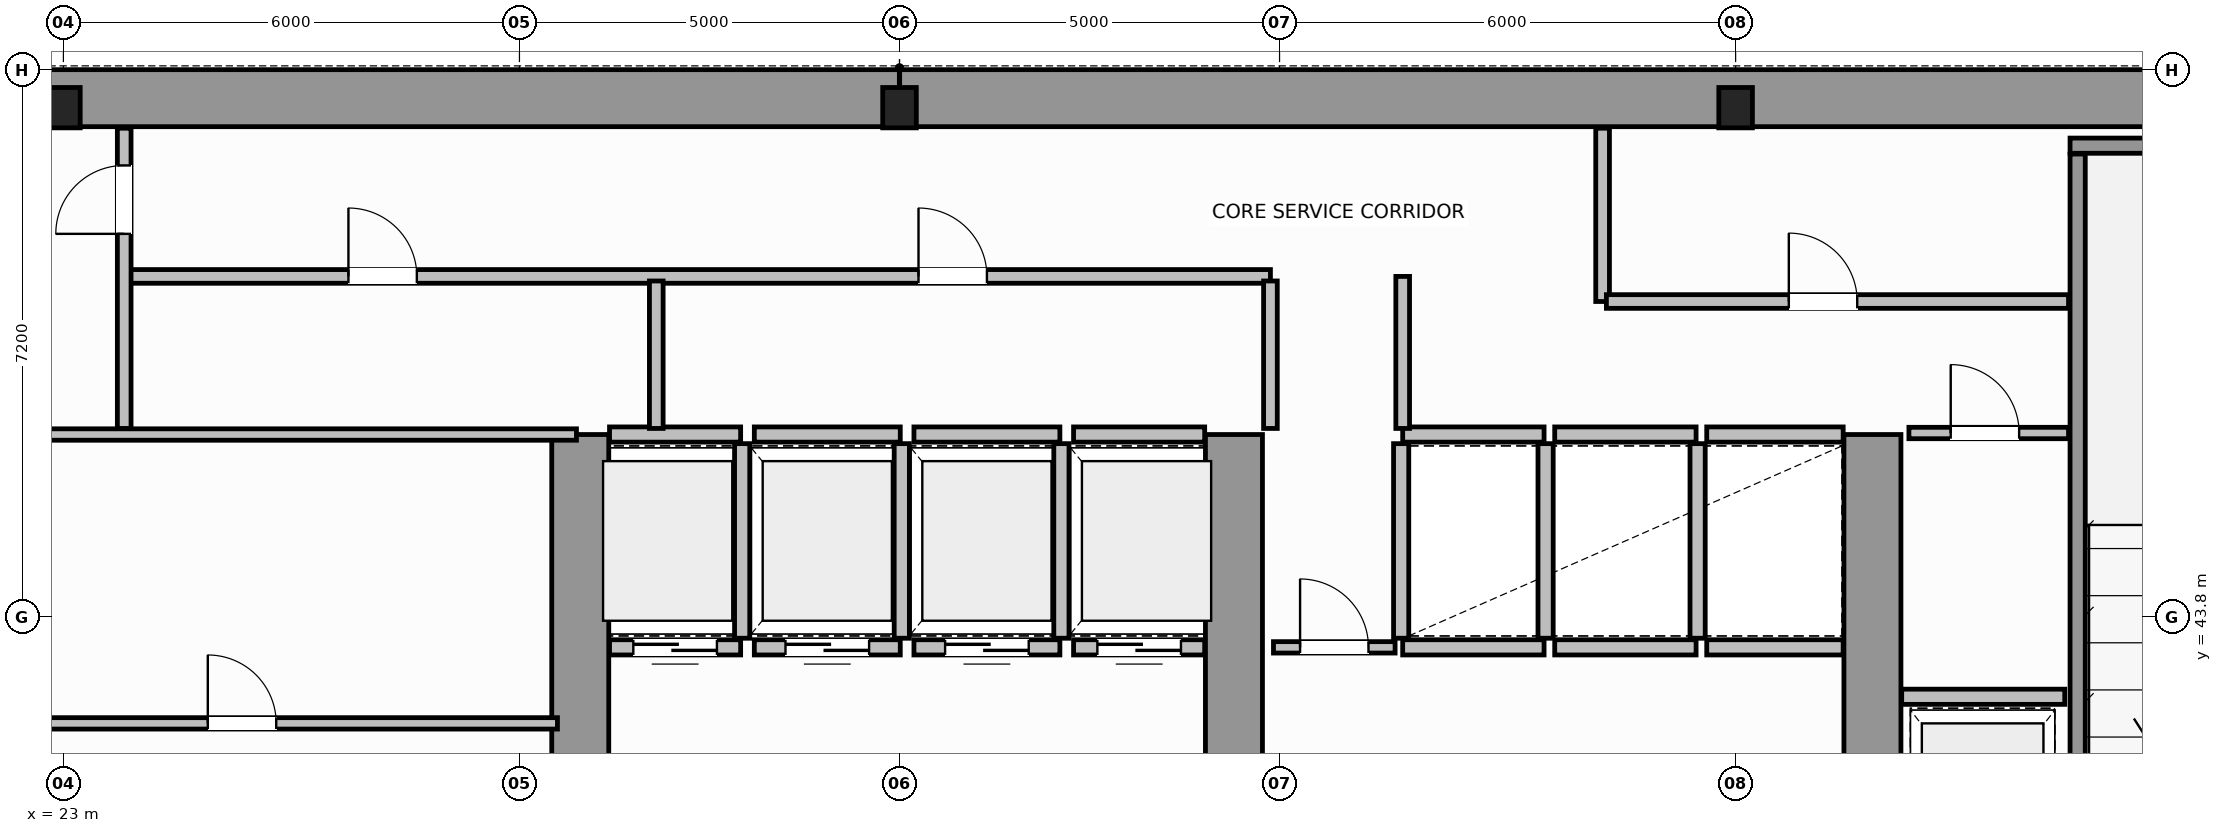
"""IFC4 building model, lengths in metres.
Left out: names, types, materials, properties, quantities, classifications, styles, units other than length and angle.
Written with IfcOpenShell. Run it as: python <this file> out.ifc"""

import sys

from ifc_helpers import new_model, si_unit, direction, frame, frame_2d, origin, origin_2d, place, context, subcontext, project, spatial, rectangle, i_section, extrude, source, transform, mapped, element, fill, save


model = new_model("IFC4")
c1 = context("Model", 3, precision=1e-05, world=origin(), true_north=direction((0.0, 1.0)))
c2 = subcontext(c1, "Body", "Model", "MODEL_VIEW")
j1 = project(units=[si_unit("LENGTHUNIT", "METRE"), si_unit("PLANEANGLEUNIT", "RADIAN")], contexts=[c1])
p1 = place(None, origin())
s1 = spatial("IfcSite", under=j1, at=p1, CompositionType="ELEMENT")
p2 = place(p1, origin())
s2 = spatial("IfcBuilding", under=s1, at=p2, CompositionType="ELEMENT")
p3 = place(p2, frame((0.0, 0.0, 122.4)))
s3 = spatial("IfcBuildingStorey", under=s2, at=p3, CompositionType="ELEMENT", Elevation=122.4)
m1 = source(origin(), c2, "Body", "SweptSolid", [
    extrude(i_section(OverallWidth=0.442, OverallDepth=0.531, WebThickness=0.065, FlangeThickness=0.076, FilletRadius=0.015, at=origin_2d()), origin(), (0.0, 0.0, 1.0), 3.8),
])
for number, where, z_axis, x_axis in (
    (1, (23.0, 50.5, 0.0), (0.0, 0.0, 1.0), (1.0, 0.0, 0.0)),
    (2, (34.0, 50.5, 0.0), (0.0, 0.0, 1.0), (1.0, 0.0, 0.0)),
    (3, (45.0, 50.5, 0.0), (0.0, 0.0, 1.0), (1.0, 0.0, 0.0)),
):
    element("IfcColumn", number, at=place(p3, frame(where, z_axis=z_axis, x_axis=x_axis)), inside=s3, PredefinedType="COLUMN", context=c2, shape_type="MappedRepresentation", body=[
        mapped(m1, transform((0.0, 0.0, 0.0), scale=1.0)),
    ])
for number, where, z_axis, x_axis in (
    (4, (14.379, 50.625, 0.0), (0.0, 0.0, 1.0), (1.0, 0.0, 0.0)),
    (5, (34.002, 50.625, 0.0), (0.0, 0.0, 1.0), (1.0, 0.0, 0.0)),
):
    element("IfcWall", number, at=place(p3, frame(where, z_axis=z_axis, x_axis=x_axis)), inside=s3, PredefinedType="SHEAR", context=c2, shape_type="SweptSolid", body=[
        extrude(rectangle(XDim=19.619, YDim=0.75, at=frame_2d((9.81, 0.0))), origin(), (0.0, 0.0, 1.0), 3.8),
    ])
for number, where, z_axis, x_axis in (
    (6, (29.8, 36.895, 0.0), (0.0, 0.0, 1.0), (0.0, 1.0, 0.0)),
    (7, (38.4, 36.895, 0.0), (0.0, 0.0, 1.0), (0.0, 1.0, 0.0)),
    (8, (46.8, 36.895, 0.0), (0.0, 0.0, 1.0), (0.0, 1.0, 0.0)),
):
    element("IfcWall", number, at=place(p3, frame(where, z_axis=z_axis, x_axis=x_axis)), inside=s3, PredefinedType="SHEAR", context=c2, shape_type="SweptSolid", body=[
        extrude(rectangle(XDim=9.305, YDim=0.75, at=frame_2d((4.652, 0.0))), origin(), (0.0, 0.0, 1.0), 3.8),
    ])
p4 = place(p3, frame((49.4, 50.0, 0.0), z_axis=(0.0, 0.0, 1.0), x_axis=(1.0, 0.0, 0.0)))
e9 = element("IfcWall", 9, at=p4, inside=s3, PredefinedType="SOLIDWALL", context=c2, shape_type="SweptSolid", body=[
    extrude(rectangle(XDim=4.225, YDim=0.2, at=frame_2d((2.113, 0.0))), origin(), (0.0, 0.0, 1.0), 3.8),
])
p5 = place(p3, frame((49.5, 39.96, 0.0), z_axis=(0.0, 0.0, 1.0), x_axis=(0.0, 1.0, 0.0)))
e10 = element("IfcWall", 10, at=p5, inside=s3, PredefinedType="SOLIDWALL", context=c2, shape_type="SweptSolid", body=[
    extrude(rectangle(XDim=9.93, YDim=0.2, at=frame_2d((4.965, 0.0))), origin(), (0.0, 0.0, 1.0), 3.8),
])
p6 = place(p3, frame((30.185, 43.4, 0.0), z_axis=(0.0, 0.0, 1.0), x_axis=(1.0, 0.0, 0.0)))
e11 = element("IfcWall", 11, at=p6, inside=s3, PredefinedType="SOLIDWALL", context=c2, shape_type="SweptSolid", body=[
    extrude(rectangle(XDim=1.725, YDim=0.2, at=frame_2d((0.862, 0.0))), origin(), (0.0, 0.0, 1.0), 3.58),
])
p7 = place(p6, frame((0.313, 0.0, 0.0)))
e12 = element("IfcOpeningElement", 12, at=p7, cuts=e11, PredefinedType="OPENING", context=c2, shape_type="SweptSolid", body=[
    extrude(rectangle(XDim=1.1, YDim=2.15, at=frame_2d((0.55, 1.075))), frame((0.0, 0.11, 0.0), z_axis=(0.0, -1.0, 0.0), x_axis=(1.0, 0.0, 0.0)), (0.0, 0.0, 1.0), 0.22),
])
p8 = place(p3, frame((30.185, 46.2, 0.0), z_axis=(0.0, 0.0, 1.0), x_axis=(1.0, 0.0, 0.0)))
e13 = element("IfcWall", 13, at=p8, inside=s3, PredefinedType="SOLIDWALL", context=c2, shape_type="SweptSolid", body=[
    extrude(rectangle(XDim=1.725, YDim=0.2, at=frame_2d((0.862, 0.0))), origin(), (0.0, 0.0, 1.0), 3.58),
])
p9 = place(p3, frame((31.93, 43.52, 0.0), z_axis=(0.0, 0.0, 1.0), x_axis=(0.0, 1.0, 0.0)))
e14 = element("IfcWall", 14, at=p9, inside=s3, PredefinedType="SOLIDWALL", context=c2, shape_type="SweptSolid", body=[
    extrude(rectangle(XDim=2.56, YDim=0.2, at=frame_2d((1.28, 0.0))), origin(), (0.0, 0.0, 1.0), 3.58),
])
p10 = place(p3, frame((32.09, 43.4, 0.0), z_axis=(0.0, 0.0, 1.0), x_axis=(1.0, 0.0, 0.0)))
e15 = element("IfcWall", 15, at=p10, inside=s3, PredefinedType="SOLIDWALL", context=c2, shape_type="SweptSolid", body=[
    extrude(rectangle(XDim=1.92, YDim=0.2, at=frame_2d((0.96, 0.0))), origin(), (0.0, 0.0, 1.0), 3.58),
])
p11 = place(p10, frame((0.41, 0.0, 0.0)))
e16 = element("IfcOpeningElement", 16, at=p11, cuts=e15, PredefinedType="OPENING", context=c2, shape_type="SweptSolid", body=[
    extrude(rectangle(XDim=1.1, YDim=2.15, at=frame_2d((0.55, 1.075))), frame((0.0, 0.11, 0.0), z_axis=(0.0, -1.0, 0.0), x_axis=(1.0, 0.0, 0.0)), (0.0, 0.0, 1.0), 0.22),
])
p12 = place(p3, frame((32.09, 46.2, 0.0), z_axis=(0.0, 0.0, 1.0), x_axis=(1.0, 0.0, 0.0)))
e17 = element("IfcWall", 17, at=p12, inside=s3, PredefinedType="SOLIDWALL", context=c2, shape_type="SweptSolid", body=[
    extrude(rectangle(XDim=1.92, YDim=0.2, at=frame_2d((0.96, 0.0))), origin(), (0.0, 0.0, 1.0), 3.58),
])
p13 = place(p3, frame((34.03, 43.52, 0.0), z_axis=(0.0, 0.0, 1.0), x_axis=(0.0, 1.0, 0.0)))
e18 = element("IfcWall", 18, at=p13, inside=s3, PredefinedType="SOLIDWALL", context=c2, shape_type="SweptSolid", body=[
    extrude(rectangle(XDim=2.56, YDim=0.2, at=frame_2d((1.28, 0.0))), origin(), (0.0, 0.0, 1.0), 3.58),
])
p14 = place(p3, frame((34.19, 43.4, 0.0), z_axis=(0.0, 0.0, 1.0), x_axis=(1.0, 0.0, 0.0)))
e19 = element("IfcWall", 19, at=p14, inside=s3, PredefinedType="SOLIDWALL", context=c2, shape_type="SweptSolid", body=[
    extrude(rectangle(XDim=1.92, YDim=0.2, at=frame_2d((0.96, 0.0))), origin(), (0.0, 0.0, 1.0), 3.58),
])
p15 = place(p14, frame((0.41, 0.0, 0.0)))
e20 = element("IfcOpeningElement", 20, at=p15, cuts=e19, PredefinedType="OPENING", context=c2, shape_type="SweptSolid", body=[
    extrude(rectangle(XDim=1.1, YDim=2.15, at=frame_2d((0.55, 1.075))), frame((0.0, 0.11, 0.0), z_axis=(0.0, -1.0, 0.0), x_axis=(1.0, 0.0, 0.0)), (0.0, 0.0, 1.0), 0.22),
])
p16 = place(p3, frame((34.19, 46.2, 0.0), z_axis=(0.0, 0.0, 1.0), x_axis=(1.0, 0.0, 0.0)))
e21 = element("IfcWall", 21, at=p16, inside=s3, PredefinedType="SOLIDWALL", context=c2, shape_type="SweptSolid", body=[
    extrude(rectangle(XDim=1.92, YDim=0.2, at=frame_2d((0.96, 0.0))), origin(), (0.0, 0.0, 1.0), 3.58),
])
p17 = place(p3, frame((36.13, 43.52, 0.0), z_axis=(0.0, 0.0, 1.0), x_axis=(0.0, 1.0, 0.0)))
e22 = element("IfcWall", 22, at=p17, inside=s3, PredefinedType="SOLIDWALL", context=c2, shape_type="SweptSolid", body=[
    extrude(rectangle(XDim=2.56, YDim=0.2, at=frame_2d((1.28, 0.0))), origin(), (0.0, 0.0, 1.0), 3.58),
])
p18 = place(p3, frame((36.29, 43.4, 0.0), z_axis=(0.0, 0.0, 1.0), x_axis=(1.0, 0.0, 0.0)))
e23 = element("IfcWall", 23, at=p18, inside=s3, PredefinedType="SOLIDWALL", context=c2, shape_type="SweptSolid", body=[
    extrude(rectangle(XDim=1.725, YDim=0.2, at=frame_2d((0.862, 0.0))), origin(), (0.0, 0.0, 1.0), 3.58),
])
p19 = place(p18, frame((0.313, 0.0, 0.0)))
e24 = element("IfcOpeningElement", 24, at=p19, cuts=e23, PredefinedType="OPENING", context=c2, shape_type="SweptSolid", body=[
    extrude(rectangle(XDim=1.1, YDim=2.15, at=frame_2d((0.55, 1.075))), frame((0.0, 0.11, 0.0), z_axis=(0.0, -1.0, 0.0), x_axis=(1.0, 0.0, 0.0)), (0.0, 0.0, 1.0), 0.22),
])
p20 = place(p3, frame((36.29, 46.2, 0.0), z_axis=(0.0, 0.0, 1.0), x_axis=(1.0, 0.0, 0.0)))
e25 = element("IfcWall", 25, at=p20, inside=s3, PredefinedType="SOLIDWALL", context=c2, shape_type="SweptSolid", body=[
    extrude(rectangle(XDim=1.725, YDim=0.2, at=frame_2d((0.862, 0.0))), origin(), (0.0, 0.0, 1.0), 3.58),
])
for number, where, z_axis, x_axis in (
    (26, (40.62, 43.4, 0.0), (0.0, 0.0, 1.0), (1.0, 0.0, 0.0)),
    (27, (40.62, 46.2, 0.0), (0.0, 0.0, 1.0), (1.0, 0.0, 0.0)),
):
    element("IfcWall", number, at=place(p3, frame(where, z_axis=z_axis, x_axis=x_axis)), inside=s3, PredefinedType="SOLIDWALL", context=c2, shape_type="SweptSolid", body=[
        extrude(rectangle(XDim=1.86, YDim=0.2, at=frame_2d((0.93, 0.0))), origin(), (0.0, 0.0, 1.0), 3.58),
    ])
for number, where, z_axis, x_axis in (
    (28, (40.6, 43.52, 0.0), (0.0, 0.0, 1.0), (0.0, 1.0, 0.0)),
    (29, (42.5, 43.52, 0.0), (0.0, 0.0, 1.0), (0.0, 1.0, 0.0)),
):
    element("IfcWall", number, at=place(p3, frame(where, z_axis=z_axis, x_axis=x_axis)), inside=s3, PredefinedType="SOLIDWALL", context=c2, shape_type="SweptSolid", body=[
        extrude(rectangle(XDim=2.56, YDim=0.2, at=frame_2d((1.28, 0.0))), origin(), (0.0, 0.0, 1.0), 3.58),
    ])
for number, where, z_axis, x_axis in (
    (30, (42.62, 43.4, 0.0), (0.0, 0.0, 1.0), (1.0, 0.0, 0.0)),
    (31, (42.62, 46.2, 0.0), (0.0, 0.0, 1.0), (1.0, 0.0, 0.0)),
):
    element("IfcWall", number, at=place(p3, frame(where, z_axis=z_axis, x_axis=x_axis)), inside=s3, PredefinedType="SOLIDWALL", context=c2, shape_type="SweptSolid", body=[
        extrude(rectangle(XDim=1.86, YDim=0.2, at=frame_2d((0.93, 0.0))), origin(), (0.0, 0.0, 1.0), 3.58),
    ])
p21 = place(p3, frame((44.5, 43.52, 0.0), z_axis=(0.0, 0.0, 1.0), x_axis=(0.0, 1.0, 0.0)))
e32 = element("IfcWall", 32, at=p21, inside=s3, PredefinedType="SOLIDWALL", context=c2, shape_type="SweptSolid", body=[
    extrude(rectangle(XDim=2.56, YDim=0.2, at=frame_2d((1.28, 0.0))), origin(), (0.0, 0.0, 1.0), 3.58),
])
for number, where, z_axis, x_axis in (
    (33, (44.62, 43.4, 0.0), (0.0, 0.0, 1.0), (1.0, 0.0, 0.0)),
    (34, (44.62, 46.2, 0.0), (0.0, 0.0, 1.0), (1.0, 0.0, 0.0)),
):
    element("IfcWall", number, at=place(p3, frame(where, z_axis=z_axis, x_axis=x_axis)), inside=s3, PredefinedType="SOLIDWALL", context=c2, shape_type="SweptSolid", body=[
        extrude(rectangle(XDim=1.795, YDim=0.2, at=frame_2d((0.897, 0.0))), origin(), (0.0, 0.0, 1.0), 3.58),
    ])
p22 = place(p3, frame((47.185, 42.75, 0.0), z_axis=(0.0, 0.0, 1.0), x_axis=(1.0, 0.0, 0.0)))
e35 = element("IfcWall", 35, at=p22, inside=s3, PredefinedType="SOLIDWALL", context=c2, shape_type="SweptSolid", body=[
    extrude(rectangle(XDim=2.145, YDim=0.2, at=frame_2d((1.073, 0.0))), origin(), (0.0, 0.0, 1.0), 3.58),
])
p23 = place(p3, frame((21.25, 46.2, 0.0), z_axis=(0.0, 0.0, 1.0), x_axis=(1.0, 0.0, 0.0)))
e36 = element("IfcWall", 36, at=p23, inside=s3, PredefinedType="PARTITIONING", context=c2, shape_type="SweptSolid", body=[
    extrude(rectangle(XDim=8.5, YDim=0.15, at=frame_2d((4.25, 0.0))), origin(), (0.0, 0.0, 1.0), 3.58),
])
p24 = place(p3, frame((21.5, 42.4, 0.0), z_axis=(0.0, 0.0, 1.0), x_axis=(1.0, 0.0, 0.0)))
e37 = element("IfcWall", 37, at=p24, inside=s3, PredefinedType="PARTITIONING", context=c2, shape_type="SweptSolid", body=[
    extrude(rectangle(XDim=8.0, YDim=0.15, at=frame_2d((4.0, 0.0))), origin(), (0.0, 0.0, 1.0), 3.58),
])
p25 = place(p24, frame((3.4, 0.0, 0.0)))
e38 = element("IfcOpeningElement", 38, at=p25, cuts=e37, PredefinedType="OPENING", context=c2, shape_type="SweptSolid", body=[
    extrude(rectangle(XDim=0.9, YDim=2.1, at=frame_2d((0.45, 1.05))), frame((0.0, 0.085, 0.0), z_axis=(0.0, -1.0, 0.0), x_axis=(1.0, 0.0, 0.0)), (0.0, 0.0, 1.0), 0.17),
])
p26 = place(p3, frame((47.28, 46.22, 0.0), z_axis=(0.0, 0.0, 1.0), x_axis=(1.0, 0.0, 0.0)))
e39 = element("IfcWall", 39, at=p26, inside=s3, PredefinedType="PARTITIONING", context=c2, shape_type="SweptSolid", body=[
    extrude(rectangle(XDim=2.1, YDim=0.15, at=frame_2d((1.05, 0.0))), origin(), (0.0, 0.0, 1.0), 3.58),
])
p27 = place(p26, frame((0.55, 0.0, 0.0)))
e40 = element("IfcOpeningElement", 40, at=p27, cuts=e39, PredefinedType="OPENING", context=c2, shape_type="SweptSolid", body=[
    extrude(rectangle(XDim=0.9, YDim=2.1, at=frame_2d((0.45, 1.05))), frame((0.0, 0.085, 0.0), z_axis=(0.0, -1.0, 0.0), x_axis=(1.0, 0.0, 0.0)), (0.0, 0.0, 1.0), 0.17),
])
p28 = place(p3, frame((38.92, 43.4, 0.0), z_axis=(0.0, 0.0, 1.0), x_axis=(1.0, 0.0, 0.0)))
e41 = element("IfcWall", 41, at=p28, inside=s3, PredefinedType="PARTITIONING", context=c2, shape_type="SweptSolid", body=[
    extrude(rectangle(XDim=1.6, YDim=0.15, at=frame_2d((0.8, 0.0))), origin(), (0.0, 0.0, 1.0), 3.58),
])
p29 = place(p28, frame((0.35, 0.0, 0.0)))
e42 = element("IfcOpeningElement", 42, at=p29, cuts=e41, PredefinedType="OPENING", context=c2, shape_type="SweptSolid", body=[
    extrude(rectangle(XDim=0.9, YDim=2.1, at=frame_2d((0.45, 1.05))), frame((0.0, 0.085, 0.0), z_axis=(0.0, -1.0, 0.0), x_axis=(1.0, 0.0, 0.0)), (0.0, 0.0, 1.0), 0.17),
])
p30 = place(p3, frame((23.85, 48.28, 0.0), z_axis=(0.0, 0.0, 1.0), x_axis=(1.0, 0.0, 0.0)))
e43 = element("IfcWall", 43, at=p30, inside=s3, PredefinedType="PLUMBINGWALL", context=c2, shape_type="SweptSolid", body=[
    extrude(rectangle(XDim=15.03, YDim=0.18, at=frame_2d((7.515, 0.0))), origin(), (0.0, 0.0, 1.0), 3.58),
])
p31 = place(p30, frame((2.9, 0.0, 0.0)))
e44 = element("IfcOpeningElement", 44, at=p31, cuts=e43, PredefinedType="OPENING", context=c2, shape_type="SweptSolid", body=[
    extrude(rectangle(XDim=0.9, YDim=2.15, at=frame_2d((0.45, 1.075))), frame((0.0, 0.1, 0.0), z_axis=(0.0, -1.0, 0.0), x_axis=(1.0, 0.0, 0.0)), (0.0, 0.0, 1.0), 0.2),
])
p32 = place(p30, frame((10.4, 0.0, 0.0)))
e45 = element("IfcOpeningElement", 45, at=p32, cuts=e43, PredefinedType="OPENING", context=c2, shape_type="SweptSolid", body=[
    extrude(rectangle(XDim=0.9, YDim=2.15, at=frame_2d((0.45, 1.075))), frame((0.0, 0.1, 0.0), z_axis=(0.0, -1.0, 0.0), x_axis=(1.0, 0.0, 0.0)), (0.0, 0.0, 1.0), 0.2),
])
p33 = place(p3, frame((23.8, 46.28, 0.0), z_axis=(0.0, 0.0, 1.0), x_axis=(0.0, 1.0, 0.0)))
e46 = element("IfcWall", 46, at=p33, inside=s3, PredefinedType="PLUMBINGWALL", context=c2, shape_type="SweptSolid", body=[
    extrude(rectangle(XDim=3.95, YDim=0.18, at=frame_2d((1.975, 0.0))), origin(), (0.0, 0.0, 1.0), 3.58),
])
p34 = place(p33, frame((2.56, 0.0, 0.0)))
e47 = element("IfcOpeningElement", 47, at=p34, cuts=e46, PredefinedType="OPENING", context=c2, shape_type="SweptSolid", body=[
    extrude(rectangle(XDim=0.9, YDim=2.15, at=frame_2d((0.45, 1.075))), frame((0.0, 0.1, 0.0), z_axis=(0.0, -1.0, 0.0), x_axis=(1.0, 0.0, 0.0)), (0.0, 0.0, 1.0), 0.2),
])
for number, where, z_axis, x_axis in (
    (48, (30.8, 46.28, 0.0), (0.0, 0.0, 1.0), (0.0, 1.0, 0.0)),
    (49, (38.88, 46.28, 0.0), (0.0, 0.0, 1.0), (0.0, 1.0, 0.0)),
):
    element("IfcWall", number, at=place(p3, frame(where, z_axis=z_axis, x_axis=x_axis)), inside=s3, PredefinedType="PLUMBINGWALL", context=c2, shape_type="SweptSolid", body=[
        extrude(rectangle(XDim=1.94, YDim=0.18, at=frame_2d((0.97, 0.0))), origin(), (0.0, 0.0, 1.0), 3.58),
    ])
p35 = place(p3, frame((40.62, 46.28, 0.0), z_axis=(0.0, 0.0, 1.0), x_axis=(0.0, 1.0, 0.0)))
e50 = element("IfcWall", 50, at=p35, inside=s3, PredefinedType="PLUMBINGWALL", context=c2, shape_type="SweptSolid", body=[
    extrude(rectangle(XDim=2.0, YDim=0.18, at=frame_2d((1.0, 0.0))), origin(), (0.0, 0.0, 1.0), 3.58),
])
p36 = place(p3, frame((43.25, 47.95, 0.0), z_axis=(0.0, 0.0, 1.0), x_axis=(0.0, 1.0, 0.0)))
e51 = element("IfcWall", 51, at=p36, inside=s3, PredefinedType="PLUMBINGWALL", context=c2, shape_type="SweptSolid", body=[
    extrude(rectangle(XDim=2.28, YDim=0.18, at=frame_2d((1.14, 0.0))), origin(), (0.0, 0.0, 1.0), 3.58),
])
p37 = place(p3, frame((43.3, 47.95, 0.0), z_axis=(0.0, 0.0, 1.0), x_axis=(1.0, 0.0, 0.0)))
e52 = element("IfcWall", 52, at=p37, inside=s3, PredefinedType="PLUMBINGWALL", context=c2, shape_type="SweptSolid", body=[
    extrude(rectangle(XDim=6.08, YDim=0.18, at=frame_2d((3.04, 0.0))), origin(), (0.0, 0.0, 1.0), 3.58),
])
p38 = place(p37, frame((2.4, 0.0, 0.0)))
e53 = element("IfcOpeningElement", 53, at=p38, cuts=e52, PredefinedType="OPENING", context=c2, shape_type="SweptSolid", body=[
    extrude(rectangle(XDim=0.9, YDim=2.15, at=frame_2d((0.45, 1.075))), frame((0.0, 0.1, 0.0), z_axis=(0.0, -1.0, 0.0), x_axis=(1.0, 0.0, 0.0)), (0.0, 0.0, 1.0), 0.2),
])
m2 = source(origin(), c2, "Body", "SweptSolid", [
    extrude(rectangle(XDim=1.1, YDim=2.15, at=frame_2d((0.55, 1.075))), frame((0.0, 0.025, 0.0), z_axis=(0.0, -1.0, 0.0), x_axis=(1.0, 0.0, 0.0)), (0.0, 0.0, 1.0), 0.05),
])
p39 = place(p7, origin())
e54 = element("IfcDoor", 54, at=p39, inside=s3, OperationType="DOUBLE_DOOR_SLIDING", PredefinedType="DOOR", context=c2, shape_type="MappedRepresentation", body=[
    mapped(m2, transform((0.0, 0.0, 0.0), scale=1.0)),
])
fill(e12, e54)
p40 = place(p11, origin())
e55 = element("IfcDoor", 55, at=p40, inside=s3, OperationType="DOUBLE_DOOR_SLIDING", PredefinedType="DOOR", context=c2, shape_type="MappedRepresentation", body=[
    mapped(m2, transform((0.0, 0.0, 0.0), scale=1.0)),
])
fill(e16, e55)
p41 = place(p15, origin())
e56 = element("IfcDoor", 56, at=p41, inside=s3, OperationType="DOUBLE_DOOR_SLIDING", PredefinedType="DOOR", context=c2, shape_type="MappedRepresentation", body=[
    mapped(m2, transform((0.0, 0.0, 0.0), scale=1.0)),
])
fill(e20, e56)
p42 = place(p19, origin())
e57 = element("IfcDoor", 57, at=p42, inside=s3, OperationType="DOUBLE_DOOR_SLIDING", PredefinedType="DOOR", context=c2, shape_type="MappedRepresentation", body=[
    mapped(m2, transform((0.0, 0.0, 0.0), scale=1.0)),
])
fill(e24, e57)
m3 = source(origin(), c2, "Body", "SweptSolid", [
    extrude(rectangle(XDim=0.9, YDim=2.1, at=frame_2d((0.45, 1.05))), frame((0.0, 0.025, 0.0), z_axis=(0.0, -1.0, 0.0), x_axis=(1.0, 0.0, 0.0)), (0.0, 0.0, 1.0), 0.05),
])
p43 = place(p25, origin())
e58 = element("IfcDoor", 58, at=p43, inside=s3, OperationType="SINGLE_SWING_RIGHT", PredefinedType="DOOR", context=c2, shape_type="MappedRepresentation", body=[
    mapped(m3, transform((0.0, 0.0, 0.0), scale=1.0)),
])
fill(e38, e58)
p44 = place(p27, origin())
e59 = element("IfcDoor", 59, at=p44, inside=s3, OperationType="SINGLE_SWING_RIGHT", PredefinedType="DOOR", context=c2, shape_type="MappedRepresentation", body=[
    mapped(m3, transform((0.0, 0.0, 0.0), scale=1.0)),
])
fill(e40, e59)
p45 = place(p29, origin())
e60 = element("IfcDoor", 60, at=p45, inside=s3, OperationType="SINGLE_SWING_LEFT", PredefinedType="DOOR", context=c2, shape_type="MappedRepresentation", body=[
    mapped(m3, transform((0.0, 0.0, 0.0), scale=1.0)),
])
fill(e42, e60)
m4 = source(origin(), c2, "Body", "SweptSolid", [
    extrude(rectangle(XDim=0.9, YDim=2.15, at=frame_2d((0.45, 1.075))), frame((0.0, 0.025, 0.0), z_axis=(0.0, -1.0, 0.0), x_axis=(1.0, 0.0, 0.0)), (0.0, 0.0, 1.0), 0.05),
])
p46 = place(p34, origin())
e61 = element("IfcDoor", 61, at=p46, inside=s3, OperationType="SINGLE_SWING_LEFT", PredefinedType="DOOR", context=c2, shape_type="MappedRepresentation", body=[
    mapped(m4, transform((0.0, 0.0, 0.0), scale=1.0)),
])
fill(e47, e61)
p47 = place(p31, origin())
e62 = element("IfcDoor", 62, at=p47, inside=s3, OperationType="SINGLE_SWING_RIGHT", PredefinedType="DOOR", context=c2, shape_type="MappedRepresentation", body=[
    mapped(m4, transform((0.0, 0.0, 0.0), scale=1.0)),
])
fill(e44, e62)
p48 = place(p32, origin())
e63 = element("IfcDoor", 63, at=p48, inside=s3, OperationType="SINGLE_SWING_LEFT", PredefinedType="DOOR", context=c2, shape_type="MappedRepresentation", body=[
    mapped(m4, transform((0.0, 0.0, 0.0), scale=1.0)),
])
fill(e45, e63)
p49 = place(p38, origin())
e64 = element("IfcDoor", 64, at=p49, inside=s3, OperationType="SINGLE_SWING_RIGHT", PredefinedType="DOOR", context=c2, shape_type="MappedRepresentation", body=[
    mapped(m4, transform((0.0, 0.0, 0.0), scale=1.0)),
])
fill(e53, e64)
save(model, sys.argv[1])
